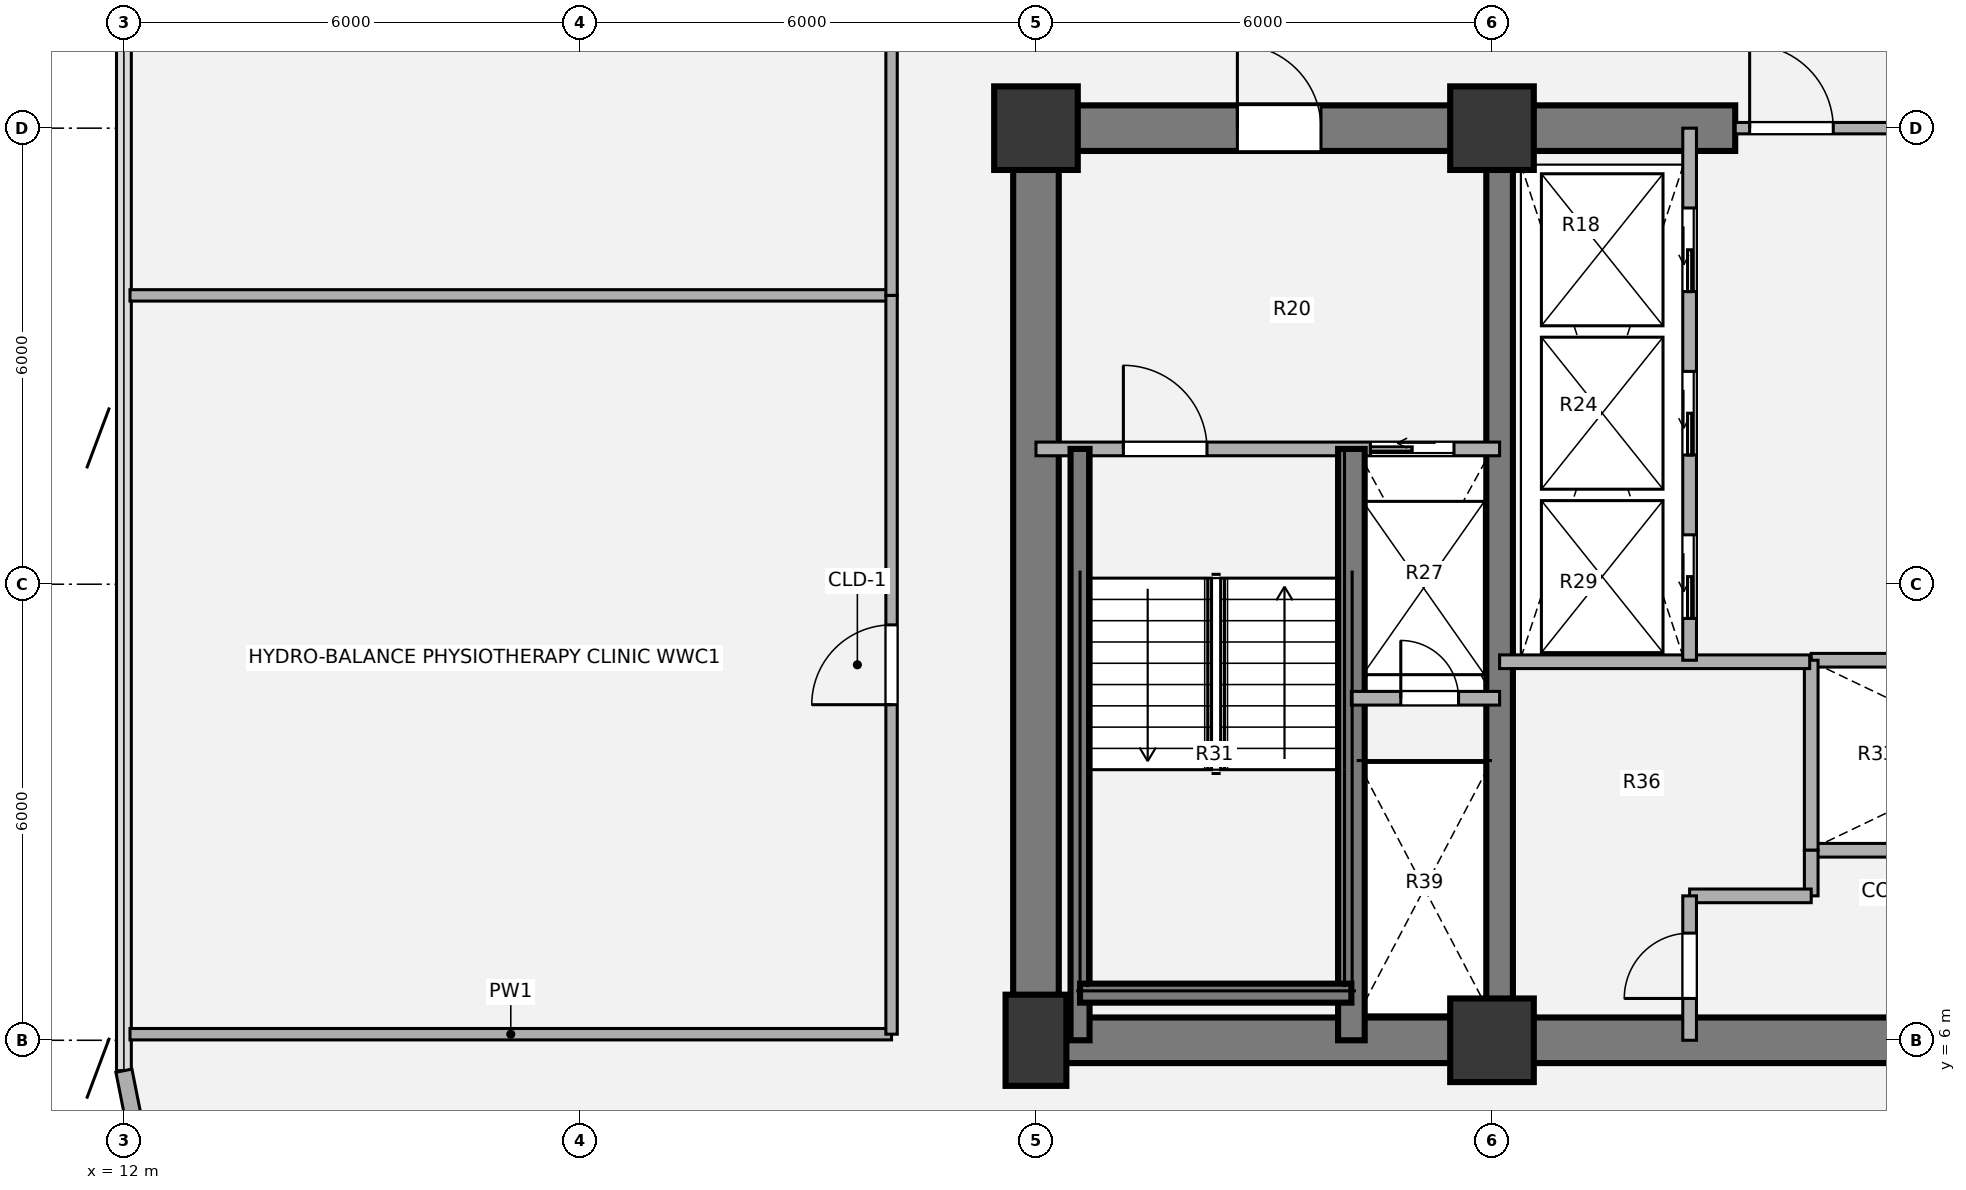
"""IFC4 building model, lengths in metres.
Left out: names, types, materials, properties, quantities, classifications, styles, units other than length and angle.
Written with IfcOpenShell. Run it as: python <this file> out.ifc"""

import sys

from ifc_helpers import new_model, si_unit, direction, frame, frame_2d, origin, origin_2d, place, context, subcontext, project, spatial, rectangle, extrude, source, transform, mapped, element, fill, save


model = new_model("IFC4")
c1 = context("Model", 3, precision=1e-05, world=origin(), true_north=direction((0.0, 1.0)))
c2 = subcontext(c1, "Body", "Model", "MODEL_VIEW")
j1 = project(units=[si_unit("LENGTHUNIT", "METRE"), si_unit("PLANEANGLEUNIT", "RADIAN")], contexts=[c1])
p1 = place(None, origin())
s1 = spatial("IfcSite", under=j1, at=p1, CompositionType="ELEMENT")
p2 = place(p1, origin())
s2 = spatial("IfcBuilding", under=s1, at=p2, CompositionType="ELEMENT")
p3 = place(p2, frame((0.0, 0.0, 72.36)))
s3 = spatial("IfcBuildingStorey", under=s2, at=p3, CompositionType="ELEMENT", Elevation=72.36)
m1 = source(origin(), c2, "Body", "SweptSolid", [
    extrude(rectangle(XDim=0.8, YDim=1.2, at=origin_2d()), origin(), (0.0, 0.0, 1.0), 3.78),
])
p4 = place(p3, frame((24.0, 6.0, 0.0), z_axis=(0.0, 0.0, 1.0), x_axis=(1.0, 0.0, 0.0)))
e1 = element("IfcColumn", 1, at=p4, inside=s3, PredefinedType="COLUMN", context=c2, shape_type="MappedRepresentation", body=[
    mapped(m1, transform((0.0, 0.0, 0.0), x_axis=(1.0, 0.0, 0.0), y_axis=(0.0, 1.0, 0.0), z_axis=(0.0, 0.0, 1.0), scale=1.0)),
])
m2 = source(origin(), c2, "Body", "SweptSolid", [
    extrude(rectangle(XDim=1.1, YDim=1.1, at=origin_2d()), origin(), (0.0, 0.0, 1.0), 3.78),
])
for number, where, z_axis, x_axis in (
    (2, (30.0, 6.0, 0.0), (0.0, 0.0, 1.0), (1.0, 0.0, 0.0)),
    (3, (24.0, 18.0, 0.0), (0.0, 0.0, 1.0), (1.0, 0.0, 0.0)),
    (4, (30.0, 18.0, 0.0), (0.0, 0.0, 1.0), (1.0, 0.0, 0.0)),
):
    element("IfcColumn", number, at=place(p3, frame(where, z_axis=z_axis, x_axis=x_axis)), inside=s3, PredefinedType="COLUMN", context=c2, shape_type="MappedRepresentation", body=[
        mapped(m2, transform((0.0, 0.0, 0.0), x_axis=(1.0, 0.0, 0.0), y_axis=(0.0, 1.0, 0.0), z_axis=(0.0, 0.0, 1.0), scale=1.0)),
    ])
p5 = place(p3, frame((48.3, 6.0, 0.0), z_axis=(0.0, 0.0, 1.0), x_axis=(-1.0, 0.0, 0.0)))
e5 = element("IfcWall", 5, at=p5, inside=s3, PredefinedType="SHEAR", context=c2, shape_type="SweptSolid", body=[
    extrude(rectangle(XDim=24.6, YDim=0.6, at=frame_2d((12.3, 0.0))), origin(), (0.0, 0.0, 1.0), 3.78),
])
p6 = place(p3, frame((24.0, 6.0, 0.0), z_axis=(0.0, 0.0, 1.0), x_axis=(0.0, 1.0, 0.0)))
e6 = element("IfcWall", 6, at=p6, inside=s3, PredefinedType="SHEAR", context=c2, shape_type="SweptSolid", body=[
    extrude(rectangle(XDim=12.0, YDim=0.6, at=frame_2d((6.0, 0.0))), origin(), (0.0, 0.0, 1.0), 3.78),
])
p7 = place(p3, frame((23.7, 18.0, 0.0), z_axis=(0.0, 0.0, 1.0), x_axis=(1.0, 0.0, 0.0)))
e7 = element("IfcWall", 7, at=p7, inside=s3, PredefinedType="SHEAR", context=c2, shape_type="SweptSolid", body=[
    extrude(rectangle(XDim=9.5, YDim=0.6, at=frame_2d((4.75, 0.0))), origin(), (0.0, 0.0, 1.0), 3.78),
])
p8 = place(p7, frame((2.95, 0.0, 0.0)))
e8 = element("IfcOpeningElement", 8, at=p8, cuts=e7, PredefinedType="OPENING", context=c2, shape_type="SweptSolid", body=[
    extrude(rectangle(XDim=1.1, YDim=2.1, at=origin_2d()), frame((0.55, 0.31, 1.05), z_axis=(0.0, -1.0, 0.0), x_axis=(1.0, 0.0, 0.0)), (0.0, 0.0, 1.0), 0.62),
])
p9 = place(p3, frame((30.1, 6.0, 0.0), z_axis=(0.0, 0.0, 1.0), x_axis=(0.0, 1.0, 0.0)))
e9 = element("IfcWall", 9, at=p9, inside=s3, PredefinedType="SHEAR", context=c2, shape_type="SweptSolid", body=[
    extrude(rectangle(XDim=12.0, YDim=0.35, at=frame_2d((6.0, 0.0))), origin(), (0.0, 0.0, 1.0), 3.78),
])
p10 = place(p3, frame((12.244, 4.375, 0.0), z_axis=(0.0, 0.0, 1.0), x_axis=(-0.195138390419, 0.980775717779, 0.0)))
e10 = element("IfcWall", 10, at=p10, inside=s3, PredefinedType="SOLIDWALL", context=c2, shape_type="SweptSolid", body=[
    extrude(rectangle(XDim=1.249, YDim=0.215, at=frame_2d((0.624, 0.0))), origin(), (0.0, 0.0, 1.0), 3.53),
])
for number, where, z_axis, x_axis in (
    (11, (34.2, 11.0, 0.0), (0.0, 0.0, 1.0), (1.0, 0.0, 0.0)),
    (12, (34.2, 8.5, 0.0), (0.0, 0.0, 1.0), (1.0, 0.0, 0.0)),
):
    element("IfcWall", number, at=place(p3, frame(where, z_axis=z_axis, x_axis=x_axis)), inside=s3, PredefinedType="PARTITIONING", context=c2, shape_type="SweptSolid", body=[
        extrude(rectangle(XDim=5.15, YDim=0.18, at=frame_2d((2.575, 0.0))), origin(), (0.0, 0.0, 1.0), 3.5),
    ])
p11 = place(p3, frame((34.2, 8.5, 0.0), z_axis=(0.0, 0.0, 1.0), x_axis=(0.0, 1.0, 0.0)))
e13 = element("IfcWall", 13, at=p11, inside=s3, PredefinedType="PARTITIONING", context=c2, shape_type="SweptSolid", body=[
    extrude(rectangle(XDim=2.5, YDim=0.18, at=frame_2d((1.25, 0.0))), origin(), (0.0, 0.0, 1.0), 3.5),
])
p12 = place(p3, frame((30.1, 10.98, 0.0), z_axis=(0.0, 0.0, 1.0), x_axis=(1.0, 0.0, 0.0)))
e14 = element("IfcWall", 14, at=p12, inside=s3, PredefinedType="PARTITIONING", context=c2, shape_type="SweptSolid", body=[
    extrude(rectangle(XDim=4.08, YDim=0.18, at=frame_2d((2.04, 0.0))), origin(), (0.0, 0.0, 1.0), 3.5),
])
p13 = place(p3, frame((34.2, 7.9, 0.0), z_axis=(0.0, 0.0, 1.0), x_axis=(0.0, 1.0, 0.0)))
e15 = element("IfcWall", 15, at=p13, inside=s3, PredefinedType="PARTITIONING", context=c2, shape_type="SweptSolid", body=[
    extrude(rectangle(XDim=0.6, YDim=0.18, at=frame_2d((0.3, 0.0))), origin(), (0.0, 0.0, 1.0), 3.5),
])
p14 = place(p3, frame((32.6, 7.9, 0.0), z_axis=(0.0, 0.0, 1.0), x_axis=(1.0, 0.0, 0.0)))
e16 = element("IfcWall", 16, at=p14, inside=s3, PredefinedType="PARTITIONING", context=c2, shape_type="SweptSolid", body=[
    extrude(rectangle(XDim=1.6, YDim=0.18, at=frame_2d((0.8, 0.0))), origin(), (0.0, 0.0, 1.0), 3.5),
])
p15 = place(p3, frame((32.6, 6.0, 0.0), z_axis=(0.0, 0.0, 1.0), x_axis=(0.0, 1.0, 0.0)))
e17 = element("IfcWall", 17, at=p15, inside=s3, PredefinedType="PARTITIONING", context=c2, shape_type="SweptSolid", body=[
    extrude(rectangle(XDim=1.9, YDim=0.18, at=frame_2d((0.95, 0.0))), origin(), (0.0, 0.0, 1.0), 3.5),
])
p16 = place(p15, frame((0.55, 0.0, 0.0)))
e18 = element("IfcOpeningElement", 18, at=p16, cuts=e17, PredefinedType="OPENING", context=c2, shape_type="SweptSolid", body=[
    extrude(rectangle(XDim=0.86, YDim=2.1, at=origin_2d()), frame((0.43, 0.1, 1.05), z_axis=(0.0, -1.0, 0.0), x_axis=(1.0, 0.0, 0.0)), (0.0, 0.0, 1.0), 0.2),
])
p17 = place(p3, frame((33.2, 18.0, 0.0), z_axis=(0.0, 0.0, 1.0), x_axis=(1.0, 0.0, 0.0)))
e19 = element("IfcWall", 19, at=p17, inside=s3, PredefinedType="PARTITIONING", context=c2, shape_type="SweptSolid", body=[
    extrude(rectangle(XDim=5.6, YDim=0.15, at=frame_2d((2.8, 0.0))), origin(), (0.0, 0.0, 1.0), 2.315),
])
p18 = place(p17, frame((0.19, 0.0, 0.0)))
e20 = element("IfcOpeningElement", 20, at=p18, cuts=e19, PredefinedType="OPENING", context=c2, shape_type="SweptSolid", body=[
    extrude(rectangle(XDim=1.1, YDim=2.1, at=origin_2d()), frame((0.55, 0.085, 1.05), z_axis=(0.0, -1.0, 0.0), x_axis=(1.0, 0.0, 0.0)), (0.0, 0.0, 1.0), 0.17),
])
p19 = place(p17, frame((4.31, 0.0, 0.0)))
e21 = element("IfcOpeningElement", 21, at=p19, cuts=e19, PredefinedType="OPENING", context=c2, shape_type="SweptSolid", body=[
    extrude(rectangle(XDim=1.1, YDim=2.1, at=origin_2d()), frame((0.55, 0.085, 1.05), z_axis=(0.0, -1.0, 0.0), x_axis=(1.0, 0.0, 0.0)), (0.0, 0.0, 1.0), 0.17),
])
p20 = place(p3, frame((24.0, 13.78, 0.0), z_axis=(0.0, 0.0, 1.0), x_axis=(1.0, 0.0, 0.0)))
e22 = element("IfcWall", 22, at=p20, inside=s3, PredefinedType="PARTITIONING", context=c2, shape_type="SweptSolid", body=[
    extrude(rectangle(XDim=6.1, YDim=0.18, at=frame_2d((3.05, 0.0))), origin(), (0.0, 0.0, 1.0), 3.5),
])
p21 = place(p20, frame((1.15, 0.0, 0.0)))
e23 = element("IfcOpeningElement", 23, at=p21, cuts=e22, PredefinedType="OPENING", context=c2, shape_type="SweptSolid", body=[
    extrude(rectangle(XDim=1.1, YDim=2.1, at=origin_2d()), frame((0.55, 0.1, 1.05), z_axis=(0.0, -1.0, 0.0), x_axis=(1.0, 0.0, 0.0)), (0.0, 0.0, 1.0), 0.2),
])
p22 = place(p20, frame((4.4, 0.0, 0.0)))
e24 = element("IfcOpeningElement", 24, at=p22, cuts=e22, PredefinedType="OPENING", context=c2, shape_type="SweptSolid", body=[
    extrude(rectangle(XDim=1.1, YDim=2.1, at=origin_2d()), frame((0.55, 0.1, 1.05), z_axis=(0.0, -1.0, 0.0), x_axis=(1.0, 0.0, 0.0)), (0.0, 0.0, 1.0), 0.2),
])
p23 = place(p3, frame((28.15, 6.0, 0.0), z_axis=(0.0, 0.0, 1.0), x_axis=(0.0, 1.0, 0.0)))
e25 = element("IfcWall", 25, at=p23, inside=s3, PredefinedType="SHEAR", context=c2, shape_type="SweptSolid", body=[
    extrude(rectangle(XDim=7.78, YDim=0.35, at=frame_2d((3.89, 0.0))), origin(), (0.0, 0.0, 1.0), 3.85),
])
p24 = place(p3, frame((24.58, 6.0, 0.0), z_axis=(0.0, 0.0, 1.0), x_axis=(0.0, 1.0, 0.0)))
e26 = element("IfcWall", 26, at=p24, inside=s3, PredefinedType="SHEAR", context=c2, shape_type="SweptSolid", body=[
    extrude(rectangle(XDim=7.78, YDim=0.25, at=frame_2d((3.89, 0.0))), origin(), (0.0, 0.0, 1.0), 3.85),
])
p25 = place(p3, frame((24.58, 6.62, 0.0), z_axis=(0.0, 0.0, 1.0), x_axis=(1.0, 0.0, 0.0)))
e27 = element("IfcWall", 27, at=p25, inside=s3, PredefinedType="SHEAR", context=c2, shape_type="SweptSolid", body=[
    extrude(rectangle(XDim=3.57, YDim=0.25, at=frame_2d((1.785, 0.0))), origin(), (0.0, 0.0, 1.0), 3.85),
])
p26 = place(p3, frame((28.15, 10.5, 0.0), z_axis=(0.0, 0.0, 1.0), x_axis=(1.0, 0.0, 0.0)))
e28 = element("IfcWall", 28, at=p26, inside=s3, PredefinedType="PARTITIONING", context=c2, shape_type="SweptSolid", body=[
    extrude(rectangle(XDim=1.95, YDim=0.18, at=frame_2d((0.975, 0.0))), origin(), (0.0, 0.0, 1.0), 3.5),
])
p27 = place(p26, frame((0.65, 0.0, 0.0)))
e29 = element("IfcOpeningElement", 29, at=p27, cuts=e28, PredefinedType="OPENING", context=c2, shape_type="SweptSolid", body=[
    extrude(rectangle(XDim=0.76, YDim=2.05, at=origin_2d()), frame((0.38, 0.1, 1.025), z_axis=(0.0, -1.0, 0.0), x_axis=(1.0, 0.0, 0.0)), (0.0, 0.0, 1.0), 0.2),
])
p28 = place(p3, frame((32.6, 11.0, 0.0), z_axis=(0.0, 0.0, 1.0), x_axis=(0.0, 1.0, 0.0)))
e30 = element("IfcWall", 30, at=p28, inside=s3, PredefinedType="PARTITIONING", context=c2, shape_type="SweptSolid", body=[
    extrude(rectangle(XDim=7.0, YDim=0.18, at=frame_2d((3.5, 0.0))), origin(), (0.0, 0.0, 1.0), 3.5),
])
p29 = place(p28, frame((0.55, 0.0, 0.0)))
e31 = element("IfcOpeningElement", 31, at=p29, cuts=e30, PredefinedType="OPENING", context=c2, shape_type="SweptSolid", body=[
    extrude(rectangle(XDim=1.1, YDim=2.1, at=origin_2d()), frame((0.55, 0.1, 1.05), z_axis=(0.0, -1.0, 0.0), x_axis=(1.0, 0.0, 0.0)), (0.0, 0.0, 1.0), 0.2),
])
p30 = place(p28, frame((2.7, 0.0, 0.0)))
e32 = element("IfcOpeningElement", 32, at=p30, cuts=e30, PredefinedType="OPENING", context=c2, shape_type="SweptSolid", body=[
    extrude(rectangle(XDim=1.1, YDim=2.1, at=origin_2d()), frame((0.55, 0.1, 1.05), z_axis=(0.0, -1.0, 0.0), x_axis=(1.0, 0.0, 0.0)), (0.0, 0.0, 1.0), 0.2),
])
p31 = place(p28, frame((4.85, 0.0, 0.0)))
e33 = element("IfcOpeningElement", 33, at=p31, cuts=e30, PredefinedType="OPENING", context=c2, shape_type="SweptSolid", body=[
    extrude(rectangle(XDim=1.1, YDim=2.1, at=origin_2d()), frame((0.55, 0.1, 1.05), z_axis=(0.0, -1.0, 0.0), x_axis=(1.0, 0.0, 0.0)), (0.0, 0.0, 1.0), 0.2),
])
for number, where, z_axis, x_axis in (
    (34, (12.08, 6.08, 0.0), (0.0, 0.0, 1.0), (1.0, 0.0, 0.0)),
    (35, (12.08, 15.8, 0.0), (0.0, 0.0, 1.0), (1.0, 0.0, 0.0)),
):
    element("IfcWall", number, at=place(p3, frame(where, z_axis=z_axis, x_axis=x_axis)), inside=s3, PredefinedType="PARTITIONING", context=c2, shape_type="SweptSolid", body=[
        extrude(rectangle(XDim=10.02, YDim=0.15, at=frame_2d((5.01, 0.0))), origin(), (0.0, 0.0, 1.0), 3.5),
    ])
p32 = place(p3, frame((22.1, 6.08, 0.0), z_axis=(0.0, 0.0, 1.0), x_axis=(0.0, 1.0, 0.0)))
e36 = element("IfcWall", 36, at=p32, inside=s3, PredefinedType="PARTITIONING", context=c2, shape_type="SweptSolid", body=[
    extrude(rectangle(XDim=9.72, YDim=0.15, at=frame_2d((4.86, 0.0))), origin(), (0.0, 0.0, 1.0), 3.5),
])
p33 = place(p32, frame((4.335, 0.0, 0.0)))
e37 = element("IfcOpeningElement", 37, at=p33, cuts=e36, PredefinedType="OPENING", context=c2, shape_type="SweptSolid", body=[
    extrude(rectangle(XDim=1.05, YDim=2.1, at=origin_2d()), frame((0.525, 0.085, 1.05), z_axis=(0.0, -1.0, 0.0), x_axis=(1.0, 0.0, 0.0)), (0.0, 0.0, 1.0), 0.17),
])
p34 = place(p3, frame((22.1, 15.8, 0.0), z_axis=(0.0, 0.0, 1.0), x_axis=(0.0, 1.0, 0.0)))
e38 = element("IfcWall", 38, at=p34, inside=s3, PredefinedType="PARTITIONING", context=c2, shape_type="SweptSolid", body=[
    extrude(rectangle(XDim=10.0, YDim=0.15, at=frame_2d((5.0, 0.0))), origin(), (0.0, 0.0, 1.0), 3.5),
])
p35 = place(p34, frame((4.475, 0.0, 0.0)))
e39 = element("IfcOpeningElement", 39, at=p35, cuts=e38, PredefinedType="OPENING", context=c2, shape_type="SweptSolid", body=[
    extrude(rectangle(XDim=1.05, YDim=2.1, at=origin_2d()), frame((0.525, 0.085, 1.05), z_axis=(0.0, -1.0, 0.0), x_axis=(1.0, 0.0, 0.0)), (0.0, 0.0, 1.0), 0.17),
])
m3 = source(origin(), c2, "Body", "SweptSolid", [
    extrude(rectangle(XDim=0.86, YDim=2.1, at=origin_2d()), frame((0.43, 0.025, 1.05), z_axis=(0.0, -1.0, 0.0), x_axis=(1.0, 0.0, 0.0)), (0.0, 0.0, 1.0), 0.05),
])
p36 = place(p16, origin())
e40 = element("IfcDoor", 40, at=p36, inside=s3, OperationType="SINGLE_SWING_LEFT", PredefinedType="DOOR", context=c2, shape_type="MappedRepresentation", body=[
    mapped(m3, transform((0.0, 0.0, 0.0), x_axis=(1.0, 0.0, 0.0), y_axis=(0.0, 1.0, 0.0), z_axis=(0.0, 0.0, 1.0), scale=1.0)),
])
fill(e18, e40)
m4 = source(origin(), c2, "Body", "SweptSolid", [
    extrude(rectangle(XDim=1.1, YDim=2.1, at=origin_2d()), frame((0.55, 0.025, 1.05), z_axis=(0.0, -1.0, 0.0), x_axis=(1.0, 0.0, 0.0)), (0.0, 0.0, 1.0), 0.05),
])
p37 = place(p18, origin())
e41 = element("IfcDoor", 41, at=p37, inside=s3, OperationType="SINGLE_SWING_LEFT", PredefinedType="DOOR", context=c2, shape_type="MappedRepresentation", body=[
    mapped(m4, transform((0.0, 0.0, 0.0), x_axis=(1.0, 0.0, 0.0), y_axis=(0.0, 1.0, 0.0), z_axis=(0.0, 0.0, 1.0), scale=1.0)),
])
fill(e20, e41)
m5 = source(origin(), c2, "Body", "SweptSolid", [
    extrude(rectangle(XDim=1.1, YDim=2.1, at=origin_2d()), frame((0.55, 0.025, 1.05), z_axis=(0.0, -1.0, 0.0), x_axis=(1.0, 0.0, 0.0)), (0.0, 0.0, 1.0), 0.05),
])
p38 = place(p21, origin())
e42 = element("IfcDoor", 42, at=p38, inside=s3, OperationType="SINGLE_SWING_LEFT", PredefinedType="DOOR", context=c2, shape_type="MappedRepresentation", body=[
    mapped(m5, transform((0.0, 0.0, 0.0), x_axis=(1.0, 0.0, 0.0), y_axis=(0.0, 1.0, 0.0), z_axis=(0.0, 0.0, 1.0), scale=1.0)),
])
fill(e23, e42)
m6 = source(origin(), c2, "Body", "SweptSolid", [
    extrude(rectangle(XDim=1.1, YDim=2.1, at=origin_2d()), frame((0.55, 0.025, 1.05), z_axis=(0.0, -1.0, 0.0), x_axis=(1.0, 0.0, 0.0)), (0.0, 0.0, 1.0), 0.05),
])
p39 = place(p22, origin())
e43 = element("IfcDoor", 43, at=p39, inside=s3, OperationType="SLIDING_TO_LEFT", PredefinedType="DOOR", context=c2, shape_type="MappedRepresentation", body=[
    mapped(m6, transform((0.0, 0.0, 0.0), x_axis=(1.0, 0.0, 0.0), y_axis=(0.0, 1.0, 0.0), z_axis=(0.0, 0.0, 1.0), scale=1.0)),
])
fill(e24, e43)
m7 = source(origin(), c2, "Body", "SweptSolid", [
    extrude(rectangle(XDim=0.76, YDim=2.05, at=origin_2d()), frame((0.38, 0.025, 1.025), z_axis=(0.0, -1.0, 0.0), x_axis=(1.0, 0.0, 0.0)), (0.0, 0.0, 1.0), 0.05),
])
p40 = place(p27, origin())
e44 = element("IfcDoor", 44, at=p40, inside=s3, OperationType="SINGLE_SWING_LEFT", PredefinedType="DOOR", context=c2, shape_type="MappedRepresentation", body=[
    mapped(m7, transform((0.0, 0.0, 0.0), x_axis=(1.0, 0.0, 0.0), y_axis=(0.0, 1.0, 0.0), z_axis=(0.0, 0.0, 1.0), scale=1.0)),
])
fill(e29, e44)
p41 = place(p8, origin())
e45 = element("IfcDoor", 45, at=p41, inside=s3, OperationType="SINGLE_SWING_LEFT", PredefinedType="DOOR", context=c2, shape_type="MappedRepresentation", body=[
    mapped(m4, transform((0.0, 0.0, 0.0), x_axis=(1.0, 0.0, 0.0), y_axis=(0.0, 1.0, 0.0), z_axis=(0.0, 0.0, 1.0), scale=1.0)),
])
fill(e8, e45)
p42 = place(p29, origin())
e46 = element("IfcDoor", 46, at=p42, inside=s3, OperationType="SLIDING_TO_LEFT", PredefinedType="DOOR", context=c2, shape_type="MappedRepresentation", body=[
    mapped(m6, transform((0.0, 0.0, 0.0), x_axis=(1.0, 0.0, 0.0), y_axis=(0.0, 1.0, 0.0), z_axis=(0.0, 0.0, 1.0), scale=1.0)),
])
fill(e31, e46)
p43 = place(p30, origin())
e47 = element("IfcDoor", 47, at=p43, inside=s3, OperationType="SLIDING_TO_LEFT", PredefinedType="DOOR", context=c2, shape_type="MappedRepresentation", body=[
    mapped(m6, transform((0.0, 0.0, 0.0), x_axis=(1.0, 0.0, 0.0), y_axis=(0.0, 1.0, 0.0), z_axis=(0.0, 0.0, 1.0), scale=1.0)),
])
fill(e32, e47)
p44 = place(p31, origin())
e48 = element("IfcDoor", 48, at=p44, inside=s3, OperationType="SLIDING_TO_LEFT", PredefinedType="DOOR", context=c2, shape_type="MappedRepresentation", body=[
    mapped(m6, transform((0.0, 0.0, 0.0), x_axis=(1.0, 0.0, 0.0), y_axis=(0.0, 1.0, 0.0), z_axis=(0.0, 0.0, 1.0), scale=1.0)),
])
fill(e33, e48)
m8 = source(origin(), c2, "Body", "SweptSolid", [
    extrude(rectangle(XDim=1.05, YDim=2.1, at=origin_2d()), frame((0.525, 0.025, 1.05), z_axis=(0.0, -1.0, 0.0), x_axis=(1.0, 0.0, 0.0)), (0.0, 0.0, 1.0), 0.05),
])
p45 = place(p33, origin())
e49 = element("IfcDoor", 49, at=p45, inside=s3, OperationType="SINGLE_SWING_LEFT", PredefinedType="DOOR", context=c2, shape_type="MappedRepresentation", body=[
    mapped(m8, transform((0.0, 0.0, 0.0), x_axis=(1.0, 0.0, 0.0), y_axis=(0.0, 1.0, 0.0), z_axis=(0.0, 0.0, 1.0), scale=1.0)),
])
fill(e37, e49)
save(model, sys.argv[1])
